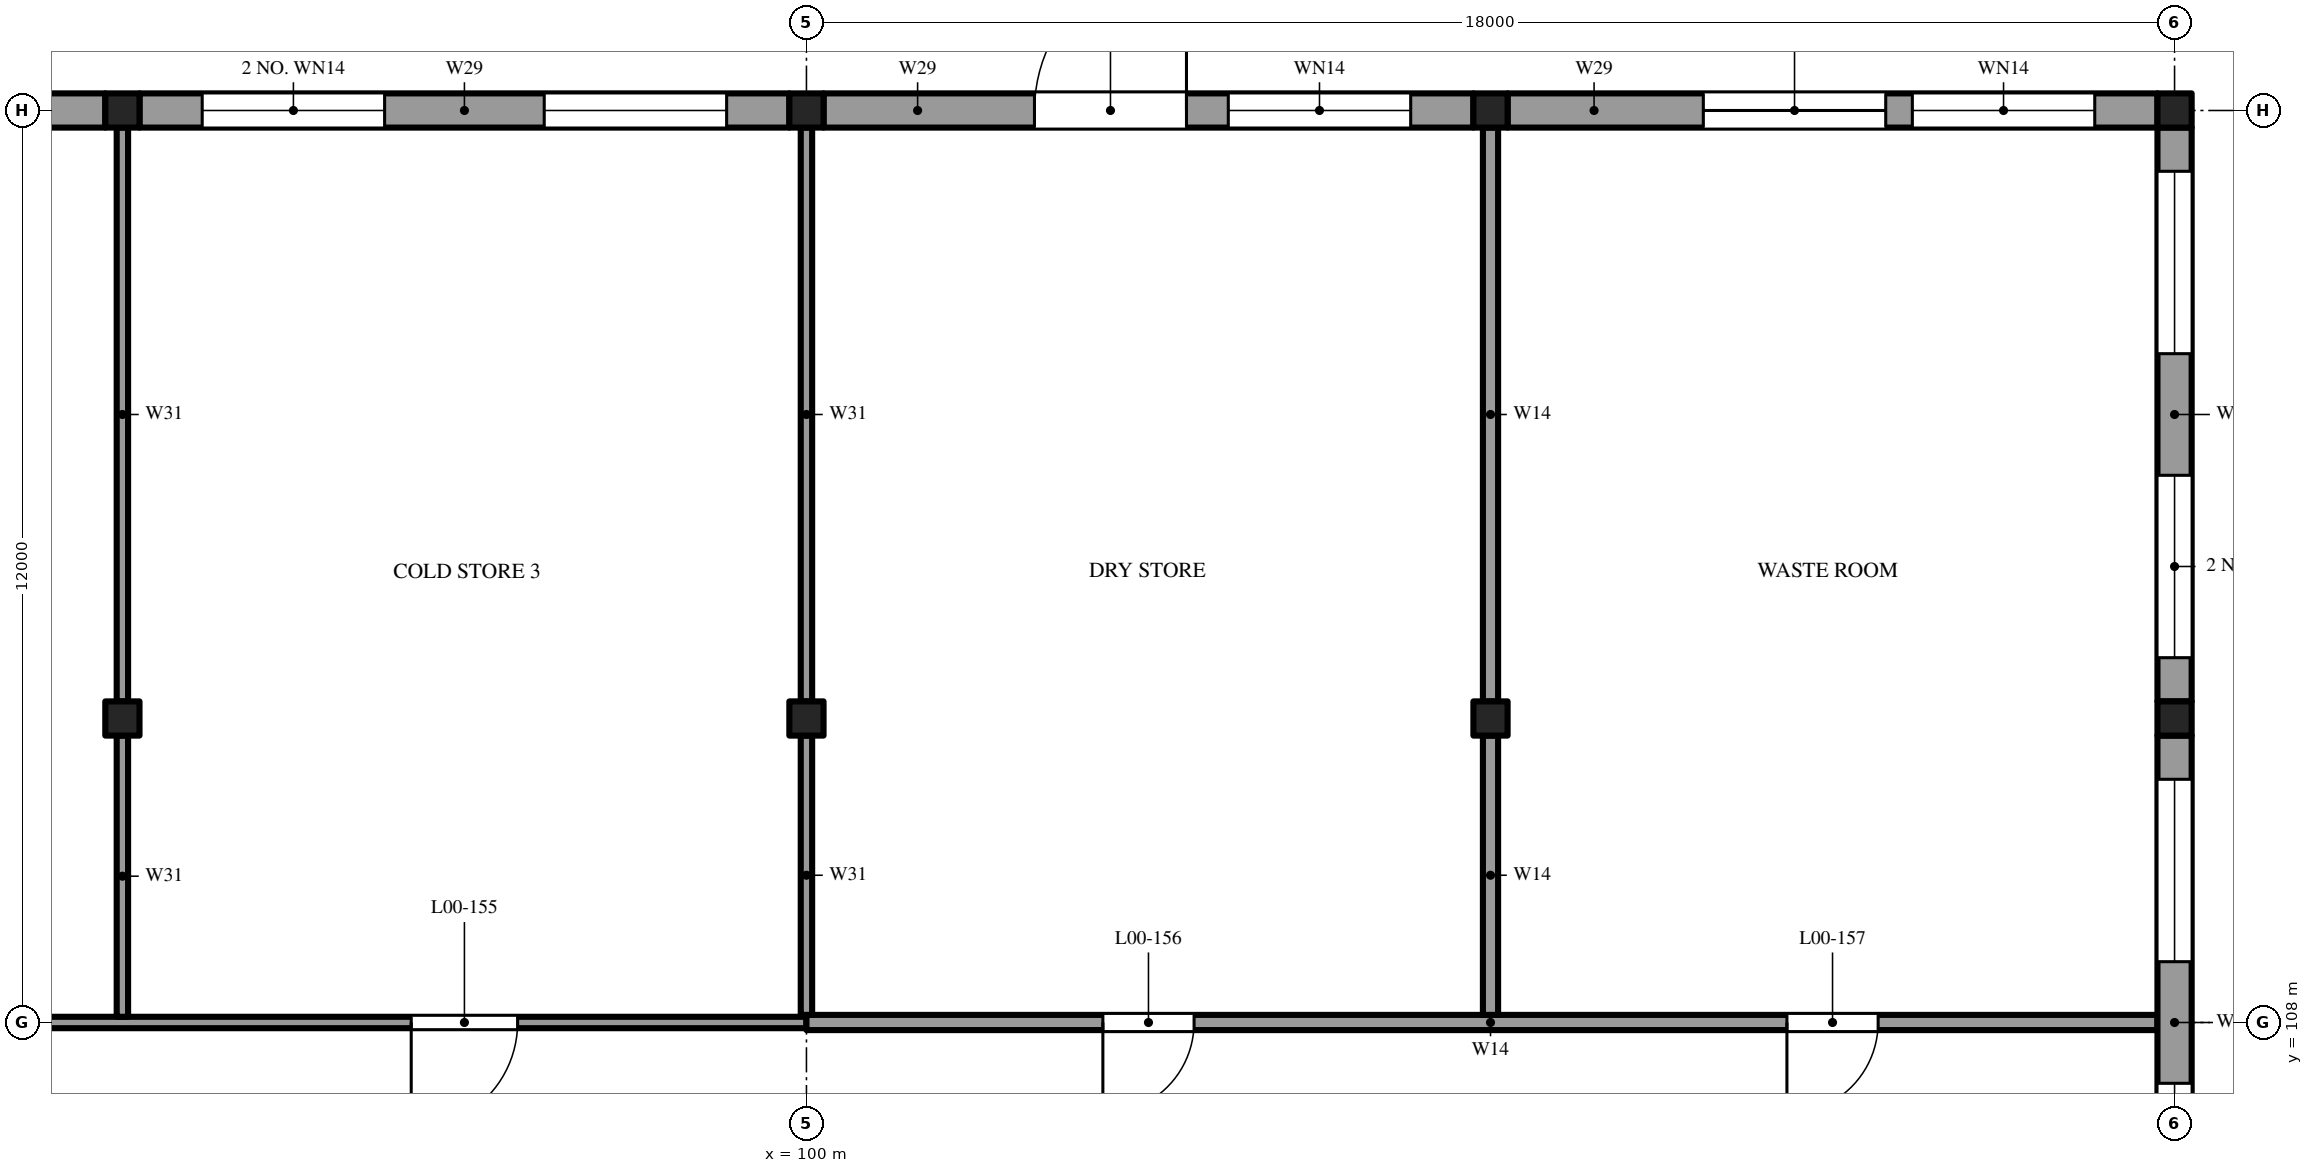
"""IFC4 building model, lengths in metres.
Left out: names, types, materials, properties, quantities, classifications, styles, units other than length and angle.
Written with IfcOpenShell. Run it as: python <this file> out.ifc"""

import sys

from ifc_helpers import new_model, si_unit, direction, frame, frame_2d, origin, origin_2d, place, context, subcontext, project, spatial, rectangle, extrude, element, fill, save


model = new_model("IFC4")
c1 = context("Model", 3, precision=1e-05, world=origin(), true_north=direction((0.0, 1.0)))
c2 = subcontext(c1, "Body", "Model", "MODEL_VIEW")
j1 = project(units=[si_unit("LENGTHUNIT", "METRE"), si_unit("PLANEANGLEUNIT", "RADIAN")], contexts=[c1])
p1 = place(None, origin())
s1 = spatial("IfcSite", under=j1, at=p1, CompositionType="ELEMENT")
p2 = place(p1, origin())
s2 = spatial("IfcBuilding", under=s1, at=p2, CompositionType="ELEMENT")
p3 = place(p2, origin())
s3 = spatial("IfcBuildingStorey", under=s2, at=p3, CompositionType="ELEMENT", Elevation=0.0)
for number, where, z_axis, x_axis in (
    (1, (91.0, 112.0, -0.4), (0.0, 0.0, 1.0), (1.0, 0.0, 0.0)),
    (2, (91.0, 120.0, -0.4), (0.0, 0.0, 1.0), (1.0, 0.0, 0.0)),
    (3, (100.0, 112.0, -0.4), (0.0, 0.0, 1.0), (1.0, 0.0, 0.0)),
    (4, (100.0, 120.0, -0.4), (0.0, 0.0, 1.0), (1.0, 0.0, 0.0)),
    (5, (109.0, 112.0, -0.4), (0.0, 0.0, 1.0), (1.0, 0.0, 0.0)),
    (6, (109.0, 120.0, -0.4), (0.0, 0.0, 1.0), (1.0, 0.0, 0.0)),
    (7, (118.0, 112.0, -0.4), (0.0, 0.0, 1.0), (1.0, 0.0, 0.0)),
    (8, (118.0, 120.0, -0.4), (0.0, 0.0, 1.0), (1.0, 0.0, 0.0)),
):
    element("IfcColumn", number, at=place(p3, frame(where, z_axis=z_axis, x_axis=x_axis)), inside=s3, PredefinedType="COLUMN", context=c2, shape_type="SweptSolid", body=[
        extrude(rectangle(XDim=0.45, YDim=0.45, at=origin_2d()), origin(), (0.0, 0.0, 1.0), 7.6),
    ])
p4 = place(p3, frame((73.0, 108.0, 0.0), z_axis=(0.0, 0.0, 1.0), x_axis=(1.0, 0.0, 0.0)))
e9 = element("IfcWall", 9, at=p4, inside=s3, PredefinedType="PARTITIONING", context=c2, shape_type="SweptSolid", body=[
    extrude(rectangle(XDim=27.0, YDim=0.15, at=frame_2d((13.5, 0.0))), origin(), (0.0, 0.0, 1.0), 6.9),
])
p5 = place(p4, frame((3.8, 0.0, 0.0)))
e10 = element("IfcOpeningElement", 10, at=p5, cuts=e9, PredefinedType="OPENING", context=c2, shape_type="SweptSolid", body=[
    extrude(rectangle(XDim=1.4, YDim=2.2, at=frame_2d((0.7, 1.1))), frame((0.0, 0.085, 0.0), z_axis=(0.0, -1.0, 0.0), x_axis=(1.0, 0.0, 0.0)), (0.0, 0.0, 1.0), 0.17),
])
p6 = place(p4, frame((12.8, 0.0, 0.0)))
e11 = element("IfcOpeningElement", 11, at=p6, cuts=e9, PredefinedType="OPENING", context=c2, shape_type="SweptSolid", body=[
    extrude(rectangle(XDim=1.4, YDim=2.2, at=frame_2d((0.7, 1.1))), frame((0.0, 0.085, 0.0), z_axis=(0.0, -1.0, 0.0), x_axis=(1.0, 0.0, 0.0)), (0.0, 0.0, 1.0), 0.17),
])
p7 = place(p4, frame((21.8, 0.0, 0.0)))
e12 = element("IfcOpeningElement", 12, at=p7, cuts=e9, PredefinedType="OPENING", context=c2, shape_type="SweptSolid", body=[
    extrude(rectangle(XDim=1.4, YDim=2.2, at=frame_2d((0.7, 1.1))), frame((0.0, 0.085, 0.0), z_axis=(0.0, -1.0, 0.0), x_axis=(1.0, 0.0, 0.0)), (0.0, 0.0, 1.0), 0.17),
])
p8 = place(p3, frame((100.0, 108.0, 0.0), z_axis=(0.0, 0.0, 1.0), x_axis=(1.0, 0.0, 0.0)))
e13 = element("IfcWall", 13, at=p8, inside=s3, PredefinedType="SOLIDWALL", context=c2, shape_type="SweptSolid", body=[
    extrude(rectangle(XDim=17.775, YDim=0.2, at=frame_2d((8.887, 0.0))), origin(), (0.0, 0.0, 1.0), 6.9),
])
p9 = place(p8, frame((3.9, 0.0, 0.0)))
e14 = element("IfcOpeningElement", 14, at=p9, cuts=e13, PredefinedType="OPENING", context=c2, shape_type="SweptSolid", body=[
    extrude(rectangle(XDim=1.2, YDim=2.1, at=frame_2d((0.6, 1.05))), frame((0.0, 0.11, 0.0), z_axis=(0.0, -1.0, 0.0), x_axis=(1.0, 0.0, 0.0)), (0.0, 0.0, 1.0), 0.22),
])
p10 = place(p8, frame((12.9, 0.0, 0.0)))
e15 = element("IfcOpeningElement", 15, at=p10, cuts=e13, PredefinedType="OPENING", context=c2, shape_type="SweptSolid", body=[
    extrude(rectangle(XDim=1.2, YDim=2.1, at=frame_2d((0.6, 1.05))), frame((0.0, 0.11, 0.0), z_axis=(0.0, -1.0, 0.0), x_axis=(1.0, 0.0, 0.0)), (0.0, 0.0, 1.0), 0.22),
])
p11 = place(p3, frame((90.775, 120.0, 0.0), z_axis=(0.0, 0.0, 1.0), x_axis=(-1.0, 0.0, 0.0)))
e16 = element("IfcWall", 16, at=p11, inside=s3, PredefinedType="SOLIDWALL", context=c2, shape_type="SweptSolid", body=[
    extrude(rectangle(XDim=8.55, YDim=0.45, at=frame_2d((4.275, 0.0))), origin(), (0.0, 0.0, 1.0), 6.9),
])
p12 = place(p11, frame((5.325, 0.0, 4.4)))
e17 = element("IfcOpeningElement", 17, at=p12, cuts=e16, PredefinedType="OPENING", context=c2, shape_type="SweptSolid", body=[
    extrude(rectangle(XDim=2.4, YDim=1.6, at=frame_2d((1.2, 0.8))), frame((0.0, 0.235, 0.0), z_axis=(0.0, -1.0, 0.0), x_axis=(1.0, 0.0, 0.0)), (0.0, 0.0, 1.0), 0.47),
])
p13 = place(p11, frame((0.825, 0.0, 4.4)))
e18 = element("IfcOpeningElement", 18, at=p13, cuts=e16, PredefinedType="OPENING", context=c2, shape_type="SweptSolid", body=[
    extrude(rectangle(XDim=2.4, YDim=1.6, at=frame_2d((1.2, 0.8))), frame((0.0, 0.235, 0.0), z_axis=(0.0, -1.0, 0.0), x_axis=(1.0, 0.0, 0.0)), (0.0, 0.0, 1.0), 0.47),
])
p14 = place(p3, frame((99.775, 120.0, 0.0), z_axis=(0.0, 0.0, 1.0), x_axis=(-1.0, 0.0, 0.0)))
e19 = element("IfcWall", 19, at=p14, inside=s3, PredefinedType="SOLIDWALL", context=c2, shape_type="SweptSolid", body=[
    extrude(rectangle(XDim=8.55, YDim=0.45, at=frame_2d((4.275, 0.0))), origin(), (0.0, 0.0, 1.0), 6.9),
])
p15 = place(p14, frame((5.325, 0.0, 4.4)))
e20 = element("IfcOpeningElement", 20, at=p15, cuts=e19, PredefinedType="OPENING", context=c2, shape_type="SweptSolid", body=[
    extrude(rectangle(XDim=2.4, YDim=1.6, at=frame_2d((1.2, 0.8))), frame((0.0, 0.235, 0.0), z_axis=(0.0, -1.0, 0.0), x_axis=(1.0, 0.0, 0.0)), (0.0, 0.0, 1.0), 0.47),
])
p16 = place(p14, frame((0.825, 0.0, 4.4)))
e21 = element("IfcOpeningElement", 21, at=p16, cuts=e19, PredefinedType="OPENING", context=c2, shape_type="SweptSolid", body=[
    extrude(rectangle(XDim=2.4, YDim=1.6, at=frame_2d((1.2, 0.8))), frame((0.0, 0.235, 0.0), z_axis=(0.0, -1.0, 0.0), x_axis=(1.0, 0.0, 0.0)), (0.0, 0.0, 1.0), 0.47),
])
p17 = place(p3, frame((108.775, 120.0, 0.0), z_axis=(0.0, 0.0, 1.0), x_axis=(-1.0, 0.0, 0.0)))
e22 = element("IfcWall", 22, at=p17, inside=s3, PredefinedType="SOLIDWALL", context=c2, shape_type="SweptSolid", body=[
    extrude(rectangle(XDim=8.55, YDim=0.45, at=frame_2d((4.275, 0.0))), origin(), (0.0, 0.0, 1.0), 6.9),
])
p18 = place(p17, frame((3.775, 0.0, 0.0)))
e23 = element("IfcOpeningElement", 23, at=p18, cuts=e22, PredefinedType="OPENING", context=c2, shape_type="SweptSolid", body=[
    extrude(rectangle(XDim=2.0, YDim=2.4, at=frame_2d((1.0, 1.2))), frame((0.0, 0.235, 0.0), z_axis=(0.0, -1.0, 0.0), x_axis=(1.0, 0.0, 0.0)), (0.0, 0.0, 1.0), 0.47),
])
p19 = place(p17, frame((0.825, 0.0, 4.4)))
e24 = element("IfcOpeningElement", 24, at=p19, cuts=e22, PredefinedType="OPENING", context=c2, shape_type="SweptSolid", body=[
    extrude(rectangle(XDim=2.4, YDim=1.6, at=frame_2d((1.2, 0.8))), frame((0.0, 0.235, 0.0), z_axis=(0.0, -1.0, 0.0), x_axis=(1.0, 0.0, 0.0)), (0.0, 0.0, 1.0), 0.47),
])
p20 = place(p3, frame((117.775, 120.0, 0.0), z_axis=(0.0, 0.0, 1.0), x_axis=(-1.0, 0.0, 0.0)))
e25 = element("IfcWall", 25, at=p20, inside=s3, PredefinedType="SOLIDWALL", context=c2, shape_type="SweptSolid", body=[
    extrude(rectangle(XDim=8.55, YDim=0.45, at=frame_2d((4.275, 0.0))), origin(), (0.0, 0.0, 1.0), 6.9),
])
p21 = place(p20, frame((3.575, 0.0, 0.0)))
e26 = element("IfcOpeningElement", 26, at=p21, cuts=e25, PredefinedType="OPENING", context=c2, shape_type="SweptSolid", body=[
    extrude(rectangle(XDim=2.4, YDim=2.4, at=frame_2d((1.2, 1.2))), frame((0.0, 0.235, 0.0), z_axis=(0.0, -1.0, 0.0), x_axis=(1.0, 0.0, 0.0)), (0.0, 0.0, 1.0), 0.47),
])
p22 = place(p20, frame((0.825, 0.0, 4.4)))
e27 = element("IfcOpeningElement", 27, at=p22, cuts=e25, PredefinedType="OPENING", context=c2, shape_type="SweptSolid", body=[
    extrude(rectangle(XDim=2.4, YDim=1.6, at=frame_2d((1.2, 0.8))), frame((0.0, 0.235, 0.0), z_axis=(0.0, -1.0, 0.0), x_axis=(1.0, 0.0, 0.0)), (0.0, 0.0, 1.0), 0.47),
])
p23 = place(p3, frame((91.0, 108.075, 0.0), z_axis=(0.0, 0.0, 1.0), x_axis=(0.0, 1.0, 0.0)))
e28 = element("IfcWall", 28, at=p23, inside=s3, PredefinedType="PARTITIONING", context=c2, shape_type="SweptSolid", body=[
    extrude(rectangle(XDim=3.7, YDim=0.15, at=frame_2d((1.85, 0.0))), origin(), (0.0, 0.0, 1.0), 6.9),
])
p24 = place(p3, frame((91.0, 112.225, 0.0), z_axis=(0.0, 0.0, 1.0), x_axis=(0.0, 1.0, 0.0)))
e29 = element("IfcWall", 29, at=p24, inside=s3, PredefinedType="PARTITIONING", context=c2, shape_type="SweptSolid", body=[
    extrude(rectangle(XDim=7.55, YDim=0.15, at=frame_2d((3.775, 0.0))), origin(), (0.0, 0.0, 1.0), 6.9),
])
p25 = place(p3, frame((100.0, 108.1, 0.0), z_axis=(0.0, 0.0, 1.0), x_axis=(0.0, 1.0, 0.0)))
e30 = element("IfcWall", 30, at=p25, inside=s3, PredefinedType="PARTITIONING", context=c2, shape_type="SweptSolid", body=[
    extrude(rectangle(XDim=3.675, YDim=0.15, at=frame_2d((1.837, 0.0))), origin(), (0.0, 0.0, 1.0), 6.9),
])
p26 = place(p3, frame((100.0, 112.225, 0.0), z_axis=(0.0, 0.0, 1.0), x_axis=(0.0, 1.0, 0.0)))
e31 = element("IfcWall", 31, at=p26, inside=s3, PredefinedType="PARTITIONING", context=c2, shape_type="SweptSolid", body=[
    extrude(rectangle(XDim=7.55, YDim=0.15, at=frame_2d((3.775, 0.0))), origin(), (0.0, 0.0, 1.0), 6.9),
])
p27 = place(p3, frame((109.0, 108.1, 0.0), z_axis=(0.0, 0.0, 1.0), x_axis=(0.0, 1.0, 0.0)))
e32 = element("IfcWall", 32, at=p27, inside=s3, PredefinedType="SOLIDWALL", context=c2, shape_type="SweptSolid", body=[
    extrude(rectangle(XDim=3.675, YDim=0.2, at=frame_2d((1.837, 0.0))), origin(), (0.0, 0.0, 1.0), 6.9),
])
p28 = place(p3, frame((109.0, 112.225, 0.0), z_axis=(0.0, 0.0, 1.0), x_axis=(0.0, 1.0, 0.0)))
e33 = element("IfcWall", 33, at=p28, inside=s3, PredefinedType="SOLIDWALL", context=c2, shape_type="SweptSolid", body=[
    extrude(rectangle(XDim=7.55, YDim=0.2, at=frame_2d((3.775, 0.0))), origin(), (0.0, 0.0, 1.0), 6.9),
])
p29 = place(p3, frame((118.0, 104.225, 0.0), z_axis=(0.0, 0.0, 1.0), x_axis=(0.0, 1.0, 0.0)))
e34 = element("IfcWall", 34, at=p29, inside=s3, PredefinedType="SOLIDWALL", context=c2, shape_type="SweptSolid", body=[
    extrude(rectangle(XDim=7.55, YDim=0.45, at=frame_2d((3.775, 0.0))), origin(), (0.0, 0.0, 1.0), 6.9),
])
p30 = place(p29, frame((0.575, 0.0, 4.4)))
e35 = element("IfcOpeningElement", 35, at=p30, cuts=e34, PredefinedType="OPENING", context=c2, shape_type="SweptSolid", body=[
    extrude(rectangle(XDim=2.4, YDim=1.6, at=frame_2d((1.2, 0.8))), frame((0.0, 0.235, 0.0), z_axis=(0.0, -1.0, 0.0), x_axis=(1.0, 0.0, 0.0)), (0.0, 0.0, 1.0), 0.47),
])
p31 = place(p29, frame((4.575, 0.0, 4.4)))
e36 = element("IfcOpeningElement", 36, at=p31, cuts=e34, PredefinedType="OPENING", context=c2, shape_type="SweptSolid", body=[
    extrude(rectangle(XDim=2.4, YDim=1.6, at=frame_2d((1.2, 0.8))), frame((0.0, 0.235, 0.0), z_axis=(0.0, -1.0, 0.0), x_axis=(1.0, 0.0, 0.0)), (0.0, 0.0, 1.0), 0.47),
])
p32 = place(p3, frame((118.0, 112.225, 0.0), z_axis=(0.0, 0.0, 1.0), x_axis=(0.0, 1.0, 0.0)))
e37 = element("IfcWall", 37, at=p32, inside=s3, PredefinedType="SOLIDWALL", context=c2, shape_type="SweptSolid", body=[
    extrude(rectangle(XDim=7.55, YDim=0.45, at=frame_2d((3.775, 0.0))), origin(), (0.0, 0.0, 1.0), 6.9),
])
p33 = place(p32, frame((0.575, 0.0, 4.4)))
e38 = element("IfcOpeningElement", 38, at=p33, cuts=e37, PredefinedType="OPENING", context=c2, shape_type="SweptSolid", body=[
    extrude(rectangle(XDim=2.4, YDim=1.6, at=frame_2d((1.2, 0.8))), frame((0.0, 0.235, 0.0), z_axis=(0.0, -1.0, 0.0), x_axis=(1.0, 0.0, 0.0)), (0.0, 0.0, 1.0), 0.47),
])
p34 = place(p32, frame((4.575, 0.0, 4.4)))
e39 = element("IfcOpeningElement", 39, at=p34, cuts=e37, PredefinedType="OPENING", context=c2, shape_type="SweptSolid", body=[
    extrude(rectangle(XDim=2.4, YDim=1.6, at=frame_2d((1.2, 0.8))), frame((0.0, 0.235, 0.0), z_axis=(0.0, -1.0, 0.0), x_axis=(1.0, 0.0, 0.0)), (0.0, 0.0, 1.0), 0.47),
])
p35 = place(p7, frame((1.4, 0.0, 0.0), z_axis=(0.0, 0.0, 1.0), x_axis=(-1.0, 0.0, 0.0)))
e40 = element("IfcDoor", 40, at=p35, inside=s3, OperationType="SINGLE_SWING_RIGHT", PredefinedType="DOOR", context=c2, shape_type="SweptSolid", body=[
    extrude(rectangle(XDim=1.4, YDim=2.2, at=frame_2d((0.7, 1.1))), frame((0.0, 0.025, 0.0), z_axis=(0.0, -1.0, 0.0), x_axis=(1.0, 0.0, 0.0)), (0.0, 0.0, 1.0), 0.05),
])
fill(e12, e40)
p36 = place(p9, frame((1.2, 0.0, 0.0), z_axis=(0.0, 0.0, 1.0), x_axis=(-1.0, 0.0, 0.0)))
e41 = element("IfcDoor", 41, at=p36, inside=s3, OperationType="SINGLE_SWING_LEFT", PredefinedType="DOOR", context=c2, shape_type="SweptSolid", body=[
    extrude(rectangle(XDim=1.2, YDim=2.1, at=frame_2d((0.6, 1.05))), frame((0.0, 0.025, 0.0), z_axis=(0.0, -1.0, 0.0), x_axis=(1.0, 0.0, 0.0)), (0.0, 0.0, 1.0), 0.05),
])
fill(e14, e41)
p37 = place(p10, frame((1.2, 0.0, 0.0), z_axis=(0.0, 0.0, 1.0), x_axis=(-1.0, 0.0, 0.0)))
e42 = element("IfcDoor", 42, at=p37, inside=s3, OperationType="SINGLE_SWING_RIGHT", PredefinedType="DOOR", context=c2, shape_type="SweptSolid", body=[
    extrude(rectangle(XDim=1.2, YDim=2.1, at=frame_2d((0.6, 1.05))), frame((0.0, 0.025, 0.0), z_axis=(0.0, -1.0, 0.0), x_axis=(1.0, 0.0, 0.0)), (0.0, 0.0, 1.0), 0.05),
])
fill(e15, e42)
p38 = place(p18, frame((2.0, 0.0, 0.0), z_axis=(0.0, 0.0, 1.0), x_axis=(-1.0, 0.0, 0.0)))
e43 = element("IfcDoor", 43, at=p38, inside=s3, OperationType="DOUBLE_DOOR_SINGLE_SWING", PredefinedType="DOOR", context=c2, shape_type="SweptSolid", body=[
    extrude(rectangle(XDim=2.0, YDim=2.4, at=frame_2d((1.0, 1.2))), frame((0.0, 0.025, 0.0), z_axis=(0.0, -1.0, 0.0), x_axis=(1.0, 0.0, 0.0)), (0.0, 0.0, 1.0), 0.05),
])
fill(e23, e43)
p39 = place(p21, frame((2.4, 0.0, 0.0), z_axis=(0.0, 0.0, 1.0), x_axis=(-1.0, 0.0, 0.0)))
e44 = element("IfcDoor", 44, at=p39, inside=s3, OperationType="ROLLINGUP", PredefinedType="DOOR", context=c2, shape_type="SweptSolid", body=[
    extrude(rectangle(XDim=2.4, YDim=2.4, at=frame_2d((1.2, 1.2))), frame((0.0, 0.025, 0.0), z_axis=(0.0, -1.0, 0.0), x_axis=(1.0, 0.0, 0.0)), (0.0, 0.0, 1.0), 0.05),
])
fill(e26, e44)
p40 = place(p15, origin())
e45 = element("IfcWindow", 45, at=p40, inside=s3, PartitioningType="SINGLE_PANEL", PredefinedType="WINDOW", context=c2, shape_type="SweptSolid", body=[
    extrude(rectangle(XDim=2.4, YDim=1.6, at=frame_2d((1.2, 0.8))), frame((0.0, 0.215, 0.0), z_axis=(0.0, -1.0, 0.0), x_axis=(1.0, 0.0, 0.0)), (0.0, 0.0, 1.0), 0.06),
])
fill(e20, e45)
p41 = place(p16, origin())
e46 = element("IfcWindow", 46, at=p41, inside=s3, PartitioningType="SINGLE_PANEL", PredefinedType="WINDOW", context=c2, shape_type="SweptSolid", body=[
    extrude(rectangle(XDim=2.4, YDim=1.6, at=frame_2d((1.2, 0.8))), frame((0.0, 0.215, 0.0), z_axis=(0.0, -1.0, 0.0), x_axis=(1.0, 0.0, 0.0)), (0.0, 0.0, 1.0), 0.06),
])
fill(e21, e46)
p42 = place(p19, origin())
e47 = element("IfcWindow", 47, at=p42, inside=s3, PartitioningType="SINGLE_PANEL", PredefinedType="WINDOW", context=c2, shape_type="SweptSolid", body=[
    extrude(rectangle(XDim=2.4, YDim=1.6, at=frame_2d((1.2, 0.8))), frame((0.0, 0.215, 0.0), z_axis=(0.0, -1.0, 0.0), x_axis=(1.0, 0.0, 0.0)), (0.0, 0.0, 1.0), 0.06),
])
fill(e24, e47)
p43 = place(p22, origin())
e48 = element("IfcWindow", 48, at=p43, inside=s3, PartitioningType="SINGLE_PANEL", PredefinedType="WINDOW", context=c2, shape_type="SweptSolid", body=[
    extrude(rectangle(XDim=2.4, YDim=1.6, at=frame_2d((1.2, 0.8))), frame((0.0, 0.215, 0.0), z_axis=(0.0, -1.0, 0.0), x_axis=(1.0, 0.0, 0.0)), (0.0, 0.0, 1.0), 0.06),
])
fill(e27, e48)
p44 = place(p30, origin())
e49 = element("IfcWindow", 49, at=p44, inside=s3, PartitioningType="SINGLE_PANEL", PredefinedType="WINDOW", context=c2, shape_type="SweptSolid", body=[
    extrude(rectangle(XDim=2.4, YDim=1.6, at=frame_2d((1.2, 0.8))), frame((0.0, 0.215, 0.0), z_axis=(0.0, -1.0, 0.0), x_axis=(1.0, 0.0, 0.0)), (0.0, 0.0, 1.0), 0.06),
])
fill(e35, e49)
p45 = place(p31, origin())
e50 = element("IfcWindow", 50, at=p45, inside=s3, PartitioningType="SINGLE_PANEL", PredefinedType="WINDOW", context=c2, shape_type="SweptSolid", body=[
    extrude(rectangle(XDim=2.4, YDim=1.6, at=frame_2d((1.2, 0.8))), frame((0.0, 0.215, 0.0), z_axis=(0.0, -1.0, 0.0), x_axis=(1.0, 0.0, 0.0)), (0.0, 0.0, 1.0), 0.06),
])
fill(e36, e50)
p46 = place(p33, origin())
e51 = element("IfcWindow", 51, at=p46, inside=s3, PartitioningType="SINGLE_PANEL", PredefinedType="WINDOW", context=c2, shape_type="SweptSolid", body=[
    extrude(rectangle(XDim=2.4, YDim=1.6, at=frame_2d((1.2, 0.8))), frame((0.0, 0.215, 0.0), z_axis=(0.0, -1.0, 0.0), x_axis=(1.0, 0.0, 0.0)), (0.0, 0.0, 1.0), 0.06),
])
fill(e38, e51)
p47 = place(p34, origin())
e52 = element("IfcWindow", 52, at=p47, inside=s3, PartitioningType="SINGLE_PANEL", PredefinedType="WINDOW", context=c2, shape_type="SweptSolid", body=[
    extrude(rectangle(XDim=2.4, YDim=1.6, at=frame_2d((1.2, 0.8))), frame((0.0, 0.215, 0.0), z_axis=(0.0, -1.0, 0.0), x_axis=(1.0, 0.0, 0.0)), (0.0, 0.0, 1.0), 0.06),
])
fill(e39, e52)
save(model, sys.argv[1])
